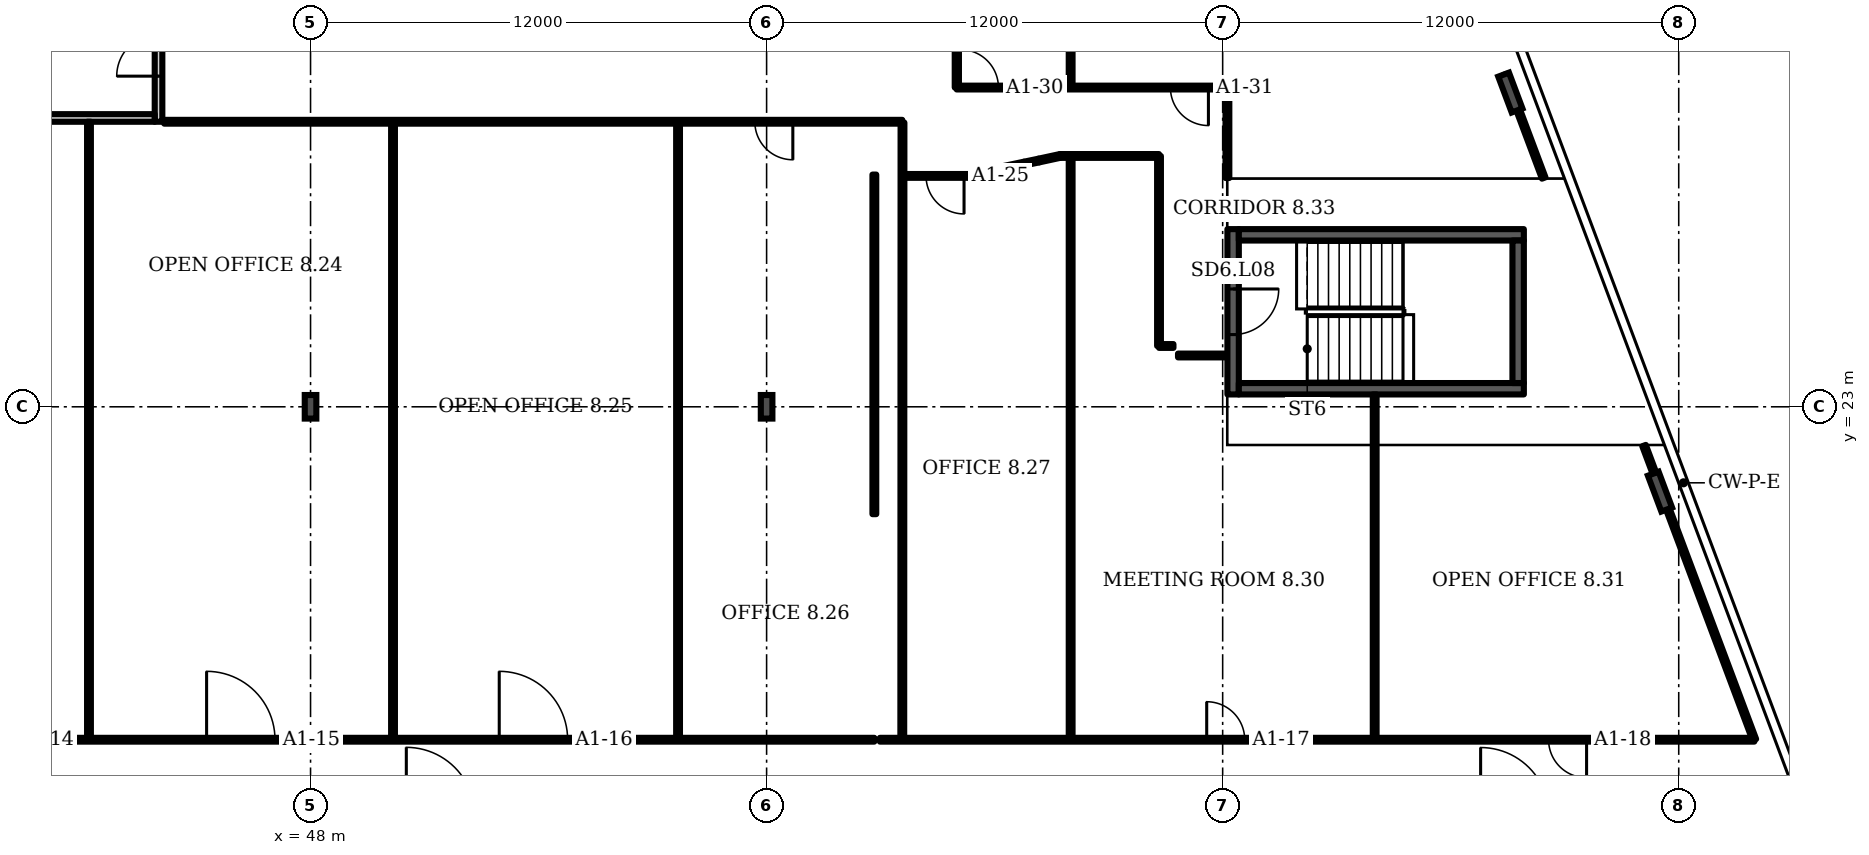
"""IFC4 building model, lengths in metres.
Left out: names, types, materials, properties, quantities, classifications, styles, units other than length and angle.
Written with IfcOpenShell. Run it as: python <this file> out.ifc"""

import sys

from ifc_helpers import new_model, si_unit, direction, frame, frame_2d, origin, origin_2d, place, context, subcontext, project, spatial, rectangle, i_section, extrude, element, fill, save


model = new_model("IFC4")
c1 = context("Model", 3, precision=1e-05, world=origin(), true_north=direction((0.0, 1.0)))
c2 = subcontext(c1, "Body", "Model", "MODEL_VIEW")
j1 = project(units=[si_unit("LENGTHUNIT", "METRE"), si_unit("PLANEANGLEUNIT", "RADIAN")], contexts=[c1])
p1 = place(None, origin())
s1 = spatial("IfcSite", under=j1, at=p1, CompositionType="ELEMENT")
p2 = place(p1, origin())
s2 = spatial("IfcBuilding", under=s1, at=p2, CompositionType="ELEMENT")
p3 = place(p2, frame((0.0, 0.0, 48.7)))
s3 = spatial("IfcBuildingStorey", under=s2, at=p3, CompositionType="ELEMENT", Elevation=48.7)
for number, where, z_axis, x_axis in (
    (1, (83.507, 20.768, 0.0), (0.0, 0.0, 1.0), (0.936, 0.351, 0.0)),
    (2, (79.57, 31.268, 0.0), (0.0, 0.0, 1.0), (0.936, 0.351, 0.0)),
):
    element("IfcColumn", number, at=place(p3, frame(where, z_axis=z_axis, x_axis=x_axis)), inside=s3, PredefinedType="COLUMN", context=c2, shape_type="SweptSolid", body=[
        extrude(i_section(OverallWidth=0.302, OverallDepth=1.008, WebThickness=0.021, FlangeThickness=0.04, FilletRadius=0.03, at=origin_2d()), origin(), (0.0, 0.0, 1.0), 3.6),
    ])
for number, where, z_axis, x_axis in (
    (3, (48.0, 23.0, 0.0), (0.0, 0.0, 1.0), (1.0, 0.0, 0.0)),
    (4, (60.0, 23.0, 0.0), (0.0, 0.0, 1.0), (1.0, 0.0, 0.0)),
):
    element("IfcColumn", number, at=place(p3, frame(where, z_axis=z_axis, x_axis=x_axis)), inside=s3, PredefinedType="COLUMN", context=c2, shape_type="SweptSolid", body=[
        extrude(i_section(OverallWidth=0.305, OverallDepth=0.62, WebThickness=0.021, FlangeThickness=0.04, FilletRadius=0.027, at=origin_2d()), origin(), (0.0, 0.0, 1.0), 3.6),
    ])
p4 = place(p3, frame((44.0, 30.5, 0.0), z_axis=(0.0, 0.0, 1.0), x_axis=(0.0, 1.0, 0.0)))
e5 = element("IfcWall", 5, at=p4, inside=s3, PredefinedType="PARTITIONING", context=c2, shape_type="SweptSolid", body=[
    extrude(rectangle(XDim=3.5, YDim=0.2, at=frame_2d((1.75, 0.0))), origin(), (0.0, 0.0, 1.0), 3.2),
])
p5 = place(p4, frame((1.2, 0.0, 0.0)))
e6 = element("IfcOpeningElement", 6, at=p5, cuts=e5, PredefinedType="OPENING", context=c2, shape_type="SweptSolid", body=[
    extrude(rectangle(XDim=1.1, YDim=2.1, at=frame_2d((0.55, 1.05))), frame((0.0, 0.11, 0.0), z_axis=(0.0, -1.0, 0.0), x_axis=(1.0, 0.0, 0.0)), (0.0, 0.0, 1.0), 0.22),
])
p6 = place(p3, frame((41.1, 30.6, 0.0), z_axis=(0.0, 0.0, 1.0), x_axis=(1.0, 0.0, 0.0)))
e7 = element("IfcWall", 7, at=p6, inside=s3, PredefinedType="PARTITIONING", context=c2, shape_type="SweptSolid", body=[
    extrude(rectangle(XDim=2.8, YDim=0.2, at=frame_2d((1.4, 0.0))), origin(), (0.0, 0.0, 1.0), 3.2),
])
p7 = place(p3, frame((72.275, 23.325, 0.0), z_axis=(0.0, 0.0, 1.0), x_axis=(0.0, 1.0, 0.0)))
e8 = element("IfcWall", 8, at=p7, inside=s3, PredefinedType="SHEAR", context=c2, shape_type="SweptSolid", body=[
    extrude(rectangle(XDim=4.35, YDim=0.3, at=frame_2d((2.175, 0.0))), origin(), (0.0, 0.0, 1.0), 3.2),
])
p8 = place(p7, frame((1.575, 0.0, 0.0)))
e9 = element("IfcOpeningElement", 9, at=p8, cuts=e8, PredefinedType="OPENING", context=c2, shape_type="SweptSolid", body=[
    extrude(rectangle(XDim=1.2, YDim=2.1, at=frame_2d((0.6, 1.05))), frame((0.0, 0.16, 0.0), z_axis=(0.0, -1.0, 0.0), x_axis=(1.0, 0.0, 0.0)), (0.0, 0.0, 1.0), 0.32),
])
p9 = place(p3, frame((11.2, 14.24, 0.0), z_axis=(0.0, 0.0, 1.0), x_axis=(1.0, 0.0, 0.0)))
e10 = element("IfcWall", 10, at=p9, inside=s3, PredefinedType="PARTITIONING", context=c2, shape_type="SweptSolid", body=[
    extrude(rectangle(XDim=51.635, YDim=0.1, at=frame_2d((25.817, 0.0))), origin(), (0.0, 0.0, 1.0), 3.2),
])
p10 = place(p9, frame((0.115, 0.0, 0.0)))
e11 = element("IfcOpeningElement", 11, at=p10, cuts=e10, PredefinedType="OPENING", context=c2, shape_type="SweptSolid", body=[
    extrude(rectangle(XDim=1.0, YDim=2.1, at=frame_2d((0.5, 1.05))), frame((0.0, 0.06, 0.0), z_axis=(0.0, -1.0, 0.0), x_axis=(1.0, 0.0, 0.0)), (0.0, 0.0, 1.0), 0.12),
])
p11 = place(p9, frame((6.635, 0.0, 0.0)))
e12 = element("IfcOpeningElement", 12, at=p11, cuts=e10, PredefinedType="OPENING", context=c2, shape_type="SweptSolid", body=[
    extrude(rectangle(XDim=1.0, YDim=2.1, at=frame_2d((0.5, 1.05))), frame((0.0, 0.06, 0.0), z_axis=(0.0, -1.0, 0.0), x_axis=(1.0, 0.0, 0.0)), (0.0, 0.0, 1.0), 0.12),
])
p12 = place(p9, frame((22.7, 0.0, 0.0)))
e13 = element("IfcOpeningElement", 13, at=p12, cuts=e10, PredefinedType="OPENING", context=c2, shape_type="SweptSolid", body=[
    extrude(rectangle(XDim=1.0, YDim=2.1, at=frame_2d((0.5, 1.05))), frame((0.0, 0.06, 0.0), z_axis=(0.0, -1.0, 0.0), x_axis=(1.0, 0.0, 0.0)), (0.0, 0.0, 1.0), 0.12),
])
p13 = place(p9, frame((27.865, 0.0, 0.0)))
e14 = element("IfcOpeningElement", 14, at=p13, cuts=e10, PredefinedType="OPENING", context=c2, shape_type="SweptSolid", body=[
    extrude(rectangle(XDim=1.0, YDim=2.1, at=frame_2d((0.5, 1.05))), frame((0.0, 0.06, 0.0), z_axis=(0.0, -1.0, 0.0), x_axis=(1.0, 0.0, 0.0)), (0.0, 0.0, 1.0), 0.12),
])
p14 = place(p9, frame((34.065, 0.0, 0.0)))
e15 = element("IfcOpeningElement", 15, at=p14, cuts=e10, PredefinedType="OPENING", context=c2, shape_type="SweptSolid", body=[
    extrude(rectangle(XDim=1.8, YDim=2.1, at=frame_2d((0.9, 1.05))), frame((0.0, 0.06, 0.0), z_axis=(0.0, -1.0, 0.0), x_axis=(1.0, 0.0, 0.0)), (0.0, 0.0, 1.0), 0.12),
])
p15 = place(p9, frame((41.765, 0.0, 0.0)))
e16 = element("IfcOpeningElement", 16, at=p15, cuts=e10, PredefinedType="OPENING", context=c2, shape_type="SweptSolid", body=[
    extrude(rectangle(XDim=1.8, YDim=2.1, at=frame_2d((0.9, 1.05))), frame((0.0, 0.06, 0.0), z_axis=(0.0, -1.0, 0.0), x_axis=(1.0, 0.0, 0.0)), (0.0, 0.0, 1.0), 0.12),
])
for number, where, z_axis, x_axis in (
    (17, (42.17, 14.24, 0.0), (0.0, 0.0, 1.0), (0.0, 1.0, 0.0)),
    (18, (50.17, 14.24, 0.0), (0.0, 0.0, 1.0), (0.0, 1.0, 0.0)),
    (19, (57.67, 14.24, 0.0), (0.0, 0.0, 1.0), (0.0, 1.0, 0.0)),
):
    element("IfcWall", number, at=place(p3, frame(where, z_axis=z_axis, x_axis=x_axis)), inside=s3, PredefinedType="PARTITIONING", context=c2, shape_type="SweptSolid", body=[
        extrude(rectangle(XDim=16.26, YDim=0.1, at=frame_2d((8.13, 0.0))), origin(), (0.0, 0.0, 1.0), 3.2),
    ])
p16 = place(p3, frame((62.835, 20.175, 0.0), z_axis=(0.0, 0.0, 1.0), x_axis=(0.0, 1.0, 0.0)))
e20 = element("IfcWall", 20, at=p16, inside=s3, PredefinedType="PARTITIONING", context=c2, shape_type="SweptSolid", body=[
    extrude(rectangle(XDim=8.935, YDim=0.1, at=frame_2d((4.468, 0.0))), origin(), (0.0, 0.0, 1.0), 3.2),
])
p17 = place(p3, frame((62.98, 14.24, 0.0), z_axis=(0.0, 0.0, 1.0), x_axis=(1.0, 0.0, 0.0)))
e21 = element("IfcWall", 21, at=p17, inside=s3, PredefinedType="PARTITIONING", context=c2, shape_type="SweptSolid", body=[
    extrude(rectangle(XDim=23.01, YDim=0.1, at=frame_2d((11.505, 0.0))), origin(), (0.0, 0.0, 1.0), 3.2),
])
p18 = place(p17, frame((8.6, 0.0, 0.0)))
e22 = element("IfcOpeningElement", 22, at=p18, cuts=e21, PredefinedType="OPENING", context=c2, shape_type="SweptSolid", body=[
    extrude(rectangle(XDim=1.0, YDim=2.1, at=frame_2d((0.5, 1.05))), frame((0.0, 0.06, 0.0), z_axis=(0.0, -1.0, 0.0), x_axis=(1.0, 0.0, 0.0)), (0.0, 0.0, 1.0), 0.12),
])
p19 = place(p17, frame((17.595, 0.0, 0.0)))
e23 = element("IfcOpeningElement", 23, at=p19, cuts=e21, PredefinedType="OPENING", context=c2, shape_type="SweptSolid", body=[
    extrude(rectangle(XDim=1.0, YDim=2.1, at=frame_2d((0.5, 1.05))), frame((0.0, 0.06, 0.0), z_axis=(0.0, -1.0, 0.0), x_axis=(1.0, 0.0, 0.0)), (0.0, 0.0, 1.0), 0.12),
])
p20 = place(p3, frame((63.57, 14.245, 0.0), z_axis=(0.0, 0.0, 1.0), x_axis=(0.000331, 1.000002, 0.0)))
e24 = element("IfcWall", 24, at=p20, inside=s3, PredefinedType="PARTITIONING", context=c2, shape_type="SweptSolid", body=[
    extrude(rectangle(XDim=16.233, YDim=0.1, at=frame_2d((8.117, 0.0))), origin(), (0.0, 0.0, 1.0), 3.2),
])
p21 = place(p3, frame((63.575, 29.075, 0.0), z_axis=(0.0, 0.0, 1.0), x_axis=(1.0, 0.0, 0.0)))
e25 = element("IfcWall", 25, at=p21, inside=s3, PredefinedType="PARTITIONING", context=c2, shape_type="SweptSolid", body=[
    extrude(rectangle(XDim=2.08, YDim=0.1, at=frame_2d((1.04, 0.0))), origin(), (0.0, 0.0, 1.0), 3.2),
])
p22 = place(p21, frame((0.62, 0.0, 0.0)))
e26 = element("IfcOpeningElement", 26, at=p22, cuts=e25, PredefinedType="OPENING", context=c2, shape_type="SweptSolid", body=[
    extrude(rectangle(XDim=1.0, YDim=2.1, at=frame_2d((0.5, 1.05))), frame((0.0, 0.06, 0.0), z_axis=(0.0, -1.0, 0.0), x_axis=(1.0, 0.0, 0.0)), (0.0, 0.0, 1.0), 0.12),
])
p23 = place(p3, frame((65.0, 31.4, 0.0), z_axis=(0.0, 0.0, 1.0), x_axis=(0.0, 1.0, 0.0)))
e27 = element("IfcWall", 27, at=p23, inside=s3, PredefinedType="PARTITIONING", context=c2, shape_type="SweptSolid", body=[
    extrude(rectangle(XDim=2.58, YDim=0.1, at=frame_2d((1.29, 0.0))), origin(), (0.0, 0.0, 1.0), 3.2),
])
p24 = place(p3, frame((65.0, 31.4, 0.0), z_axis=(0.0, 0.0, 1.0), x_axis=(1.0, 0.0, 0.0)))
e28 = element("IfcWall", 28, at=p24, inside=s3, PredefinedType="PARTITIONING", context=c2, shape_type="SweptSolid", body=[
    extrude(rectangle(XDim=7.125, YDim=0.1, at=frame_2d((3.562, 0.0))), origin(), (0.0, 0.0, 1.0), 3.2),
])
p25 = place(p24, frame((0.1, 0.0, 0.0)))
e29 = element("IfcOpeningElement", 29, at=p25, cuts=e28, PredefinedType="OPENING", context=c2, shape_type="SweptSolid", body=[
    extrude(rectangle(XDim=1.0, YDim=2.1, at=frame_2d((0.5, 1.05))), frame((0.0, 0.06, 0.0), z_axis=(0.0, -1.0, 0.0), x_axis=(1.0, 0.0, 0.0)), (0.0, 0.0, 1.0), 0.12),
])
p26 = place(p24, frame((5.625, 0.0, 0.0)))
e30 = element("IfcOpeningElement", 30, at=p26, cuts=e28, PredefinedType="OPENING", context=c2, shape_type="SweptSolid", body=[
    extrude(rectangle(XDim=1.0, YDim=2.1, at=frame_2d((0.5, 1.05))), frame((0.0, 0.06, 0.0), z_axis=(0.0, -1.0, 0.0), x_axis=(1.0, 0.0, 0.0)), (0.0, 0.0, 1.0), 0.12),
])
p27 = place(p3, frame((65.655, 29.075, 0.0), z_axis=(0.0, 0.0, 1.0), x_axis=(0.671773, 0.740757, 0.0)))
e31 = element("IfcWall", 31, at=p27, inside=s3, PredefinedType="PARTITIONING", context=c2, shape_type="SweptSolid", body=[
    extrude(rectangle(XDim=0.149, YDim=0.1, at=frame_2d((0.074, 0.0))), origin(), (0.0, 0.0, 1.0), 3.2),
])
p28 = place(p3, frame((65.755, 29.185, 0.0), z_axis=(0.0, 0.0, 1.0), x_axis=(0.978739, 0.205118, 0.0)))
e32 = element("IfcWall", 32, at=p28, inside=s3, PredefinedType="PARTITIONING", context=c2, shape_type="SweptSolid", body=[
    extrude(rectangle(XDim=1.047, YDim=0.1, at=frame_2d((0.524, 0.0))), origin(), (0.0, 0.0, 1.0), 3.2),
])
p29 = place(p3, frame((66.78, 29.4, 0.0), z_axis=(0.0, 0.0, 1.0), x_axis=(0.979048, 0.203632, 0.0)))
e33 = element("IfcWall", 33, at=p29, inside=s3, PredefinedType="PARTITIONING", context=c2, shape_type="SweptSolid", body=[
    extrude(rectangle(XDim=0.393, YDim=0.1, at=frame_2d((0.197, 0.0))), origin(), (0.0, 0.0, 1.0), 3.2),
])
p30 = place(p3, frame((67.165, 29.48, 0.0), z_axis=(0.0, 0.0, 1.0), x_axis=(0.977367, 0.211555, 0.0)))
e34 = element("IfcWall", 34, at=p30, inside=s3, PredefinedType="PARTITIONING", context=c2, shape_type="SweptSolid", body=[
    extrude(rectangle(XDim=0.568, YDim=0.1, at=frame_2d((0.284, 0.0))), origin(), (0.0, 0.0, 1.0), 3.2),
])
p31 = place(p3, frame((67.72, 29.6, 0.0), z_axis=(0.0, 0.0, 1.0), x_axis=(1.0, 0.0, 0.0)))
e35 = element("IfcWall", 35, at=p31, inside=s3, PredefinedType="PARTITIONING", context=c2, shape_type="SweptSolid", body=[
    extrude(rectangle(XDim=2.605, YDim=0.1, at=frame_2d((1.302, 0.0))), origin(), (0.0, 0.0, 1.0), 3.2),
])
p32 = place(p3, frame((68.0, 14.24, 0.0), z_axis=(0.0, 0.0, 1.0), x_axis=(0.0, 1.0, 0.0)))
e36 = element("IfcWall", 36, at=p32, inside=s3, PredefinedType="PARTITIONING", context=c2, shape_type="SweptSolid", body=[
    extrude(rectangle(XDim=15.36, YDim=0.1, at=frame_2d((7.68, 0.0))), origin(), (0.0, 0.0, 1.0), 3.2),
])
p33 = place(p3, frame((68.0, 31.4, 0.0), z_axis=(0.0, 0.0, 1.0), x_axis=(0.0, 1.0, 0.0)))
e37 = element("IfcWall", 37, at=p33, inside=s3, PredefinedType="PARTITIONING", context=c2, shape_type="SweptSolid", body=[
    extrude(rectangle(XDim=8.39, YDim=0.1, at=frame_2d((4.195, 0.0))), origin(), (0.0, 0.0, 1.0), 3.2),
])
p34 = place(p3, frame((70.325, 24.6, 0.0), z_axis=(0.0, 0.0, 1.0), x_axis=(0.0, 1.0, 0.0)))
e38 = element("IfcWall", 38, at=p34, inside=s3, PredefinedType="PARTITIONING", context=c2, shape_type="SweptSolid", body=[
    extrude(rectangle(XDim=5.0, YDim=0.1, at=frame_2d((2.5, 0.0))), origin(), (0.0, 0.0, 1.0), 3.2),
])
p35 = place(p3, frame((70.325, 24.6, 0.0), z_axis=(0.0, 0.0, 1.0), x_axis=(1.0, 0.0, 0.0)))
e39 = element("IfcWall", 39, at=p35, inside=s3, PredefinedType="PARTITIONING", context=c2, shape_type="SweptSolid", body=[
    extrude(rectangle(XDim=0.38, YDim=0.1, at=frame_2d((0.19, 0.0))), origin(), (0.0, 0.0, 1.0), 3.2),
])
p36 = place(p3, frame((70.825, 24.35, 0.0), z_axis=(0.0, 0.0, 1.0), x_axis=(1.0, 0.0, 0.0)))
e40 = element("IfcWall", 40, at=p36, inside=s3, PredefinedType="PARTITIONING", context=c2, shape_type="SweptSolid", body=[
    extrude(rectangle(XDim=1.28, YDim=0.1, at=frame_2d((0.64, 0.0))), origin(), (0.0, 0.0, 1.0), 3.2),
])
p37 = place(p3, frame((72.125, 29.02, 0.0), z_axis=(0.0, 0.0, 1.0), x_axis=(0.0, 1.0, 0.0)))
e41 = element("IfcWall", 41, at=p37, inside=s3, PredefinedType="PARTITIONING", context=c2, shape_type="SweptSolid", body=[
    extrude(rectangle(XDim=2.38, YDim=0.1, at=frame_2d((1.19, 0.0))), origin(), (0.0, 0.0, 1.0), 3.2),
])
p38 = place(p3, frame((76.0, 14.24, 0.0), z_axis=(0.0, 0.0, 1.0), x_axis=(0.0, 1.0, 0.0)))
e42 = element("IfcWall", 42, at=p38, inside=s3, PredefinedType="PARTITIONING", context=c2, shape_type="SweptSolid", body=[
    extrude(rectangle(XDim=9.085, YDim=0.1, at=frame_2d((4.542, 0.0))), origin(), (0.0, 0.0, 1.0), 3.2),
])
p39 = place(p3, frame((80.448, 29.02, 0.0), z_axis=(0.0, 0.0, 1.0), x_axis=(-0.35129, 0.93627, 0.0)))
e43 = element("IfcWall", 43, at=p39, inside=s3, PredefinedType="PARTITIONING", context=c2, shape_type="SweptSolid", body=[
    extrude(rectangle(XDim=2.911, YDim=0.1, at=frame_2d((1.455, 0.0))), origin(), (0.0, 0.0, 1.0), 2.58),
])
p40 = place(p3, frame((85.99, 14.24, 0.0), z_axis=(0.0, 0.0, 1.0), x_axis=(-0.351133, 0.936325, 0.0)))
e44 = element("IfcWall", 44, at=p40, inside=s3, PredefinedType="PARTITIONING", context=c2, shape_type="SweptSolid", body=[
    extrude(rectangle(XDim=8.266, YDim=0.1, at=frame_2d((4.133, 0.0))), origin(), (0.0, 0.0, 1.0), 2.58),
])
p41 = place(p3, frame((44.15, 30.5, 0.0), z_axis=(0.0, 0.0, 1.0), x_axis=(1.0, 0.0, 0.0)))
e45 = element("IfcWall", 45, at=p41, inside=s3, PredefinedType="PARTITIONING", context=c2, shape_type="SweptSolid", body=[
    extrude(rectangle(XDim=19.42, YDim=0.1, at=frame_2d((9.71, 0.0))), origin(), (0.0, 0.0, 1.0), 3.2),
])
p42 = place(p41, frame((15.54, 0.0, 0.0)))
e46 = element("IfcOpeningElement", 46, at=p42, cuts=e45, PredefinedType="OPENING", context=c2, shape_type="SweptSolid", body=[
    extrude(rectangle(XDim=1.0, YDim=2.1, at=frame_2d((0.5, 1.05))), frame((0.0, 0.06, 0.0), z_axis=(0.0, -1.0, 0.0), x_axis=(1.0, 0.0, 0.0)), (0.0, 0.0, 1.0), 0.12),
])
for number, where, z_axis, x_axis in (
    (47, (72.425, 23.475, 0.0), (0.0, 0.0, 1.0), (1.0, 0.0, 0.0)),
    (48, (72.425, 27.525, 0.0), (0.0, 0.0, 1.0), (1.0, 0.0, 0.0)),
):
    element("IfcWall", number, at=place(p3, frame(where, z_axis=z_axis, x_axis=x_axis)), inside=s3, PredefinedType="SHEAR", context=c2, shape_type="SweptSolid", body=[
        extrude(rectangle(XDim=7.5, YDim=0.3, at=frame_2d((3.75, 0.0))), origin(), (0.0, 0.0, 1.0), 3.2),
    ])
p43 = place(p3, frame((79.775, 23.625, 0.0), z_axis=(0.0, 0.0, 1.0), x_axis=(0.0, 1.0, 0.0)))
e49 = element("IfcWall", 49, at=p43, inside=s3, PredefinedType="SHEAR", context=c2, shape_type="SweptSolid", body=[
    extrude(rectangle(XDim=3.75, YDim=0.3, at=frame_2d((1.875, 0.0))), origin(), (0.0, 0.0, 1.0), 3.2),
])
p44 = place(p5, origin())
e50 = element("IfcDoor", 50, at=p44, inside=s3, OperationType="SINGLE_SWING_LEFT", PredefinedType="DOOR", context=c2, shape_type="SweptSolid", body=[
    extrude(rectangle(XDim=1.1, YDim=2.1, at=frame_2d((0.55, 1.05))), frame((0.0, 0.025, 0.0), z_axis=(0.0, -1.0, 0.0), x_axis=(1.0, 0.0, 0.0)), (0.0, 0.0, 1.0), 0.05),
])
fill(e6, e50)
p45 = place(p8, origin())
e51 = element("IfcDoor", 51, at=p45, inside=s3, OperationType="SINGLE_SWING_RIGHT", PredefinedType="DOOR", context=c2, shape_type="SweptSolid", body=[
    extrude(rectangle(XDim=1.2, YDim=2.1, at=frame_2d((0.6, 1.05))), frame((0.0, 0.025, 0.0), z_axis=(0.0, -1.0, 0.0), x_axis=(1.0, 0.0, 0.0)), (0.0, 0.0, 1.0), 0.05),
])
fill(e9, e51)
p46 = place(p14, origin())
e52 = element("IfcDoor", 52, at=p46, inside=s3, OperationType="DOUBLE_DOOR_SINGLE_SWING", PredefinedType="DOOR", context=c2, shape_type="SweptSolid", body=[
    extrude(rectangle(XDim=1.8, YDim=2.1, at=frame_2d((0.9, 1.05))), frame((0.0, 0.025, 0.0), z_axis=(0.0, -1.0, 0.0), x_axis=(1.0, 0.0, 0.0)), (0.0, 0.0, 1.0), 0.05),
])
fill(e15, e52)
p47 = place(p15, origin())
e53 = element("IfcDoor", 53, at=p47, inside=s3, OperationType="DOUBLE_DOOR_SINGLE_SWING", PredefinedType="DOOR", context=c2, shape_type="SweptSolid", body=[
    extrude(rectangle(XDim=1.8, YDim=2.1, at=frame_2d((0.9, 1.05))), frame((0.0, 0.025, 0.0), z_axis=(0.0, -1.0, 0.0), x_axis=(1.0, 0.0, 0.0)), (0.0, 0.0, 1.0), 0.05),
])
fill(e16, e53)
p48 = place(p18, origin())
e54 = element("IfcDoor", 54, at=p48, inside=s3, OperationType="SINGLE_SWING_LEFT", PredefinedType="DOOR", context=c2, shape_type="SweptSolid", body=[
    extrude(rectangle(XDim=1.0, YDim=2.1, at=frame_2d((0.5, 1.05))), frame((0.0, 0.025, 0.0), z_axis=(0.0, -1.0, 0.0), x_axis=(1.0, 0.0, 0.0)), (0.0, 0.0, 1.0), 0.05),
])
fill(e22, e54)
p49 = place(p19, origin())
e55 = element("IfcDoor", 55, at=p49, inside=s3, OperationType="SINGLE_SWING_RIGHT", PredefinedType="DOOR", context=c2, shape_type="SweptSolid", body=[
    extrude(rectangle(XDim=1.0, YDim=2.1, at=frame_2d((0.5, 1.05))), frame((0.0, 0.025, 0.0), z_axis=(0.0, -1.0, 0.0), x_axis=(1.0, 0.0, 0.0)), (0.0, 0.0, 1.0), 0.05),
])
fill(e23, e55)
p50 = place(p22, origin())
e56 = element("IfcDoor", 56, at=p50, inside=s3, OperationType="SINGLE_SWING_RIGHT", PredefinedType="DOOR", context=c2, shape_type="SweptSolid", body=[
    extrude(rectangle(XDim=1.0, YDim=2.1, at=frame_2d((0.5, 1.05))), frame((0.0, 0.025, 0.0), z_axis=(0.0, -1.0, 0.0), x_axis=(1.0, 0.0, 0.0)), (0.0, 0.0, 1.0), 0.05),
])
fill(e26, e56)
p51 = place(p42, origin())
e57 = element("IfcDoor", 57, at=p51, inside=s3, OperationType="SINGLE_SWING_RIGHT", PredefinedType="DOOR", context=c2, shape_type="SweptSolid", body=[
    extrude(rectangle(XDim=1.0, YDim=2.1, at=frame_2d((0.5, 1.05))), frame((0.0, 0.025, 0.0), z_axis=(0.0, -1.0, 0.0), x_axis=(1.0, 0.0, 0.0)), (0.0, 0.0, 1.0), 0.05),
])
fill(e46, e57)
p52 = place(p25, origin())
e58 = element("IfcDoor", 58, at=p52, inside=s3, OperationType="SINGLE_SWING_LEFT", PredefinedType="DOOR", context=c2, shape_type="SweptSolid", body=[
    extrude(rectangle(XDim=1.0, YDim=2.1, at=frame_2d((0.5, 1.05))), frame((0.0, 0.025, 0.0), z_axis=(0.0, -1.0, 0.0), x_axis=(1.0, 0.0, 0.0)), (0.0, 0.0, 1.0), 0.05),
])
fill(e29, e58)
p53 = place(p26, origin())
e59 = element("IfcDoor", 59, at=p53, inside=s3, OperationType="SINGLE_SWING_RIGHT", PredefinedType="DOOR", context=c2, shape_type="SweptSolid", body=[
    extrude(rectangle(XDim=1.0, YDim=2.1, at=frame_2d((0.5, 1.05))), frame((0.0, 0.025, 0.0), z_axis=(0.0, -1.0, 0.0), x_axis=(1.0, 0.0, 0.0)), (0.0, 0.0, 1.0), 0.05),
])
fill(e30, e59)
save(model, sys.argv[1])
